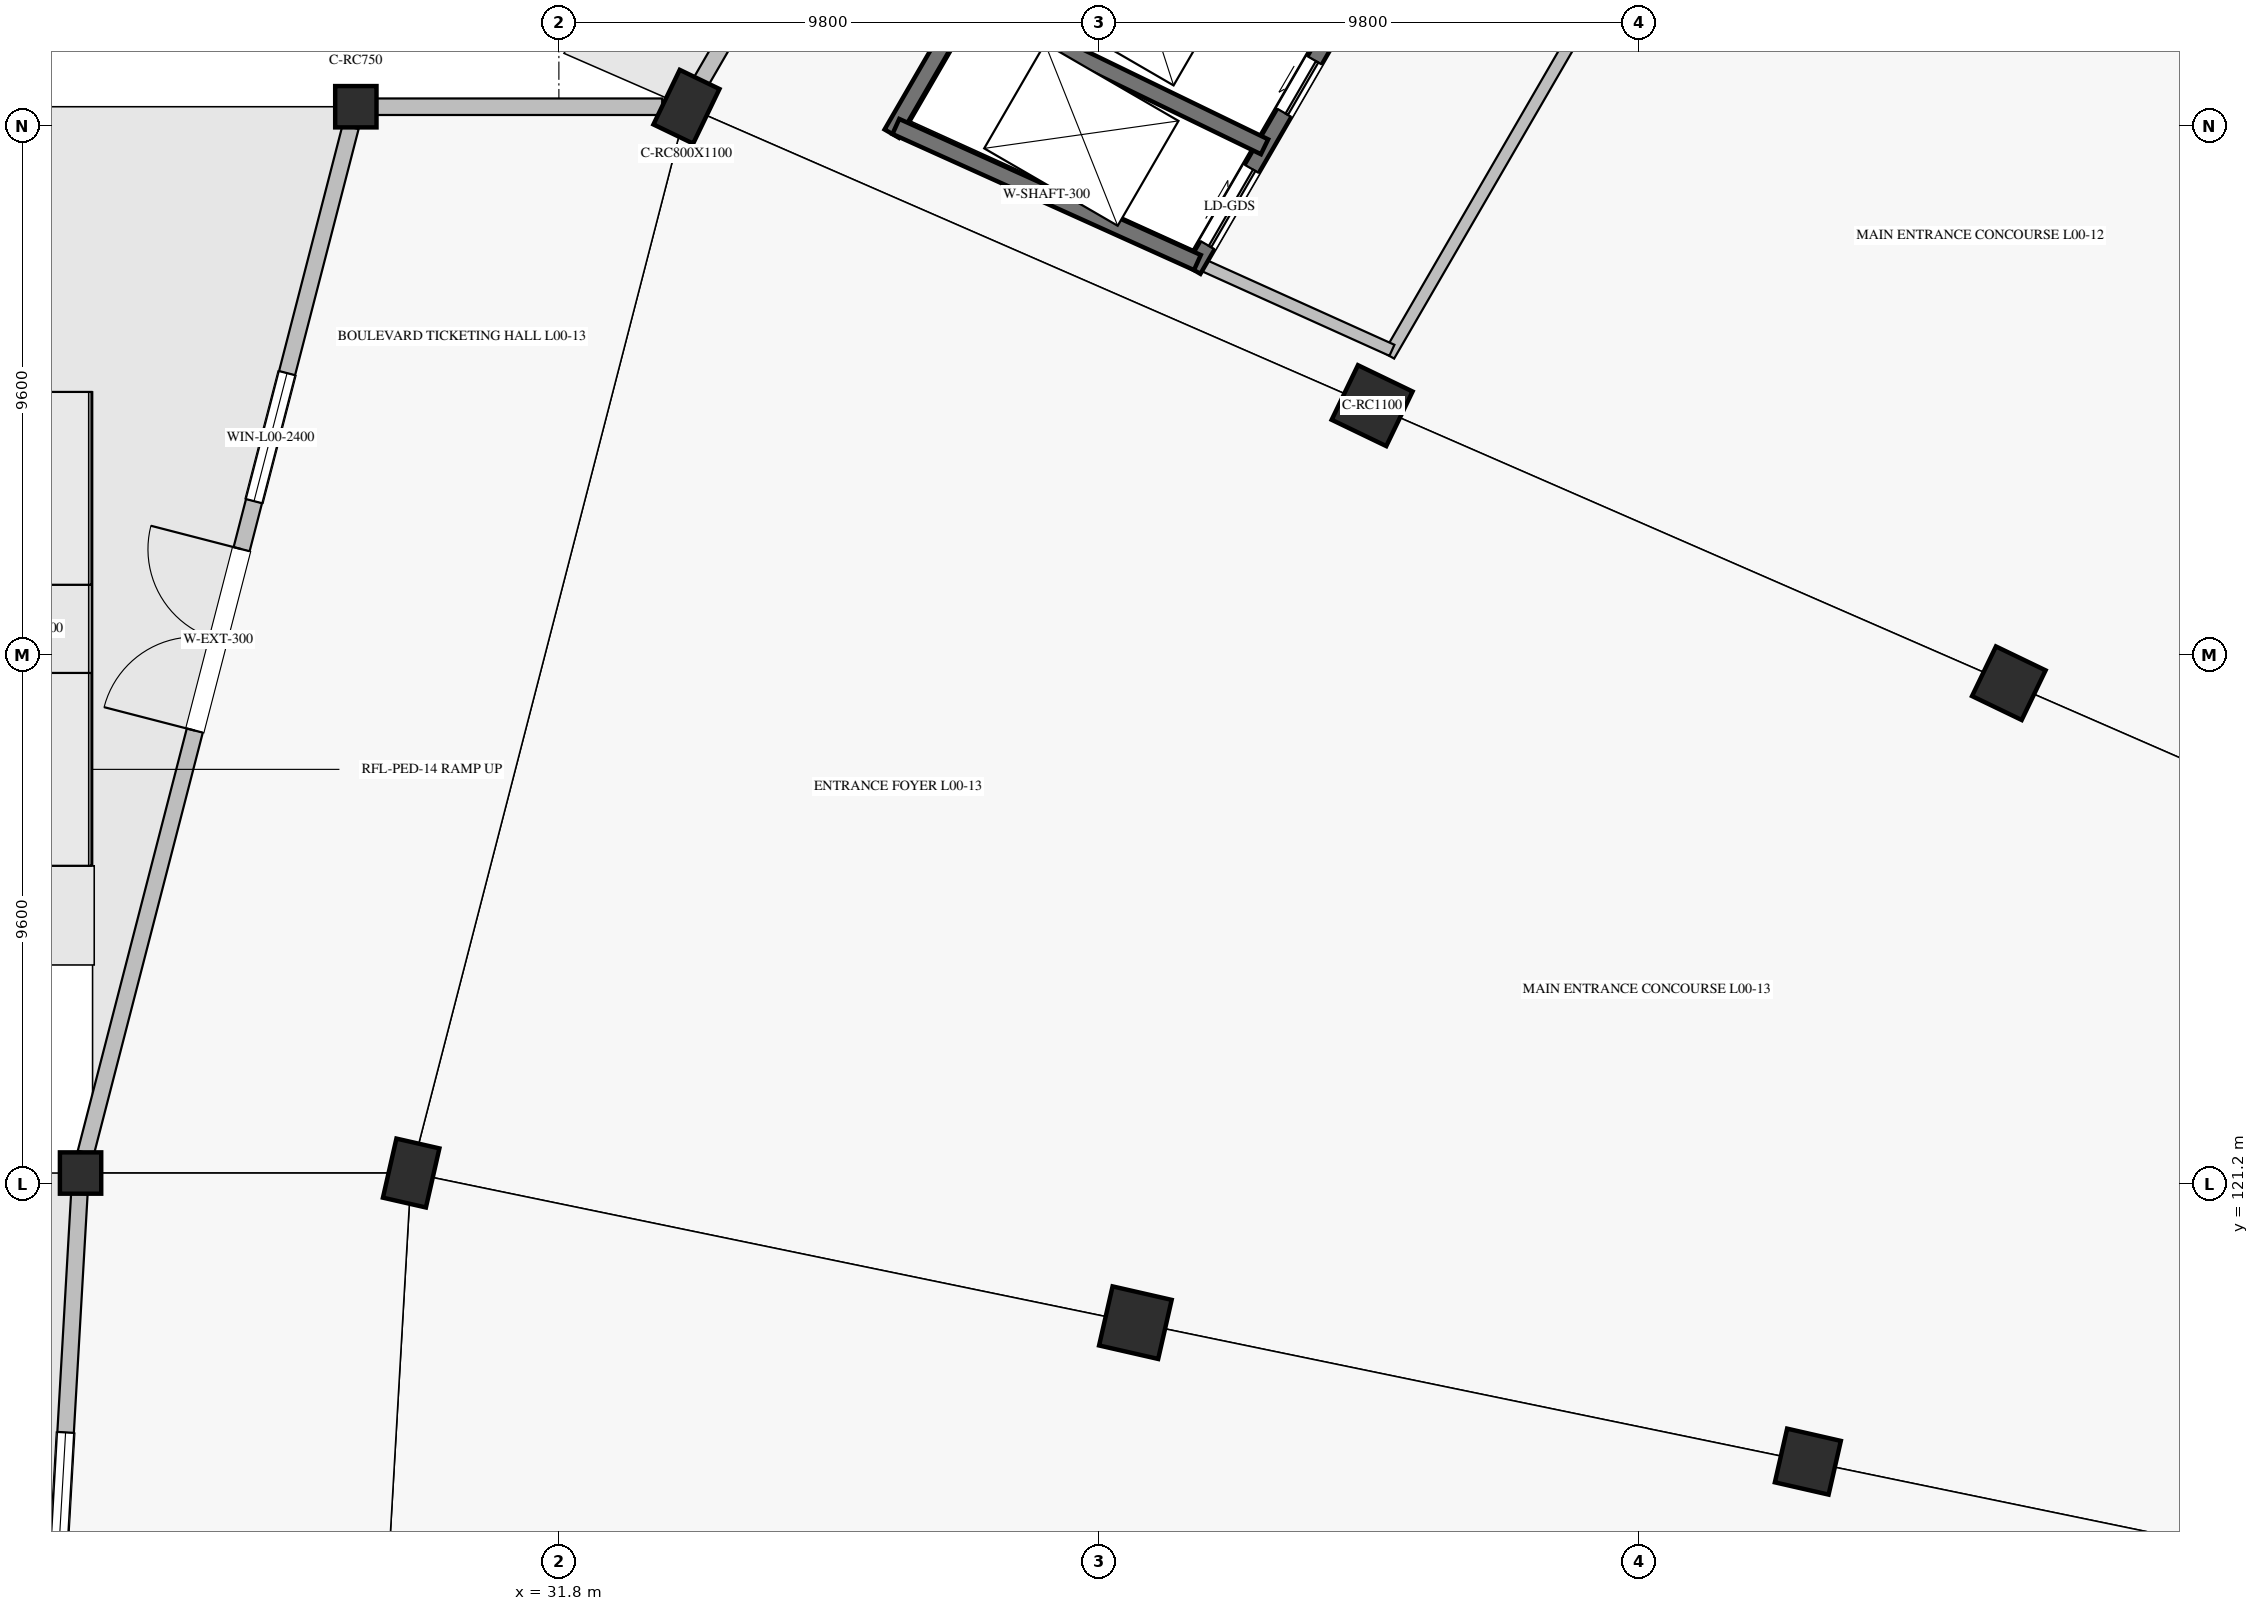
"""IFC4 building model, lengths in metres.
Left out: names, types, materials, properties, quantities, classifications, styles, units other than length and angle.
Written with IfcOpenShell. Run it as: python <this file> out.ifc"""

import sys

from ifc_helpers import new_model, si_unit, direction, frame, frame_2d, origin, origin_2d, place, context, subcontext, project, spatial, rectangle, extrude, element, fill, save


model = new_model("IFC4")
c1 = context("Model", 3, precision=1e-05, world=origin(), true_north=direction((0.0, 1.0)))
c2 = subcontext(c1, "Body", "Model", "MODEL_VIEW")
j1 = project(units=[si_unit("LENGTHUNIT", "METRE"), si_unit("PLANEANGLEUNIT", "RADIAN")], contexts=[c1])
p1 = place(None, origin())
s1 = spatial("IfcSite", under=j1, at=p1, CompositionType="ELEMENT")
p2 = place(p1, origin())
s2 = spatial("IfcBuilding", under=s1, at=p2, CompositionType="ELEMENT")
p3 = place(p2, origin())
s3 = spatial("IfcBuildingStorey", under=s2, at=p3, CompositionType="ELEMENT", Elevation=0.0)
for number, where, z_axis, x_axis in (
    (1, (58.114, 130.287, 0.0), (0.0, 0.0, 1.0), (-0.901, 0.434, 0.0)),
    (2, (54.467, 116.16, 0.0), (0.0, 0.0, 1.0), (-0.975, 0.223, 0.0)),
):
    element("IfcColumn", number, at=place(p3, frame(where, z_axis=z_axis, x_axis=x_axis)), inside=s3, PredefinedType="COLUMN", context=c2, shape_type="SweptSolid", body=[
        extrude(rectangle(XDim=1.0, YDim=1.0, at=origin_2d()), origin(), (0.0, 0.0, 1.0), 5.78),
    ])
for number, where, z_axis, x_axis in (
    (3, (46.559, 135.325, 0.0), (0.0, 0.0, 1.0), (-0.901, 0.434, 0.0)),
    (4, (42.262, 118.682, 0.0), (0.0, 0.0, 1.0), (-0.975, 0.223, 0.0)),
):
    element("IfcColumn", number, at=place(p3, frame(where, z_axis=z_axis, x_axis=x_axis)), inside=s3, PredefinedType="COLUMN", context=c2, shape_type="SweptSolid", body=[
        extrude(rectangle(XDim=1.1, YDim=1.1, at=origin_2d()), origin(), (0.0, 0.0, 1.0), 5.78),
    ])
for number, where, z_axis, x_axis in (
    (5, (34.115, 140.75, 0.0), (0.0, 0.0, 1.0), (-0.901, 0.434, 0.0)),
    (6, (29.119, 121.398, 0.0), (0.0, 0.0, 1.0), (-0.975, 0.223, 0.0)),
):
    element("IfcColumn", number, at=place(p3, frame(where, z_axis=z_axis, x_axis=x_axis)), inside=s3, PredefinedType="COLUMN", context=c2, shape_type="SweptSolid", body=[
        extrude(rectangle(XDim=0.8, YDim=1.1, at=origin_2d()), origin(), (0.0, 0.0, 1.0), 5.78),
    ])
for number, where, z_axis, x_axis in (
    (7, (28.115, 140.75, 0.0), (0.0, 0.0, 1.0), (1.0, 0.0, 0.0)),
    (8, (23.119, 121.398, 0.0), (0.0, 0.0, 1.0), (1.0, 0.0, 0.0)),
):
    element("IfcColumn", number, at=place(p3, frame(where, z_axis=z_axis, x_axis=x_axis)), inside=s3, PredefinedType="COLUMN", context=c2, shape_type="SweptSolid", body=[
        extrude(rectangle(XDim=0.75, YDim=0.75, at=origin_2d()), origin(), (0.0, 0.0, 1.0), 5.78),
    ])
p4 = place(p3, frame((33.675, 140.75, 0.0), z_axis=(0.0, 0.0, 1.0), x_axis=(-1.0, 0.0, 0.0)))
e9 = element("IfcWall", 9, at=p4, inside=s3, PredefinedType="SOLIDWALL", context=c2, shape_type="SweptSolid", body=[
    extrude(rectangle(XDim=5.18, YDim=0.3, at=frame_2d((2.59, 0.0))), origin(), (0.0, 0.0, 1.0), 4.8),
])
p5 = place(p3, frame((44.309, 158.33, 0.0), z_axis=(0.0, 0.0, 1.0), x_axis=(-0.501609752715, -0.865094015689, 0.0)))
e10 = element("IfcWall", 10, at=p5, inside=s3, PredefinedType="SOLIDWALL", context=c2, shape_type="SweptSolid", body=[
    extrude(rectangle(XDim=19.932, YDim=0.3, at=frame_2d((9.966, 0.0))), origin(), (0.0, 0.0, 1.0), 4.8),
])
p6 = place(p5, frame((1.05, 0.0, 0.0)))
e11 = element("IfcOpeningElement", 11, at=p6, cuts=e10, PredefinedType="OPENING", context=c2, shape_type="SweptSolid", body=[
    extrude(rectangle(XDim=2.0, YDim=2.3, at=frame_2d((1.0, 1.15))), frame((0.0, 0.16, 0.0), z_axis=(0.0, -1.0, 0.0), x_axis=(1.0, 0.0, 0.0)), (0.0, 0.0, 1.0), 0.32),
])
p7 = place(p3, frame((28.02, 140.382, 0.0), z_axis=(0.0, 0.0, 1.0), x_axis=(-0.249965196191, -0.968254822189, 0.0)))
e12 = element("IfcWall", 12, at=p7, inside=s3, PredefinedType="SOLIDWALL", context=c2, shape_type="SweptSolid", body=[
    extrude(rectangle(XDim=19.226, YDim=0.3, at=frame_2d((9.613, 0.0))), origin(), (0.0, 0.0, 1.0), 4.8),
])
p8 = place(p7, frame((7.913, 0.0, 0.0)))
e13 = element("IfcOpeningElement", 13, at=p8, cuts=e12, PredefinedType="OPENING", context=c2, shape_type="SweptSolid", body=[
    extrude(rectangle(XDim=3.4, YDim=2.6, at=frame_2d((1.7, 1.3))), frame((0.0, 0.16, 0.0), z_axis=(0.0, -1.0, 0.0), x_axis=(1.0, 0.0, 0.0)), (0.0, 0.0, 1.0), 0.32),
])
p9 = place(p7, frame((4.613, 0.0, 1.1)))
e14 = element("IfcOpeningElement", 14, at=p9, cuts=e12, PredefinedType="OPENING", context=c2, shape_type="SweptSolid", body=[
    extrude(rectangle(XDim=2.4, YDim=1.8, at=frame_2d((1.2, 0.9))), frame((0.0, 0.16, 0.0), z_axis=(0.0, -1.0, 0.0), x_axis=(1.0, 0.0, 0.0)), (0.0, 0.0, 1.0), 0.32),
])
p10 = place(p3, frame((23.097, 121.018, 0.0), z_axis=(0.0, 0.0, 1.0), x_axis=(-0.057602801108, -0.998339580155, 0.0)))
e15 = element("IfcWall", 15, at=p10, inside=s3, PredefinedType="SOLIDWALL", context=c2, shape_type="SweptSolid", body=[
    extrude(rectangle(XDim=18.67, YDim=0.3, at=frame_2d((9.335, 0.0))), origin(), (0.0, 0.0, 1.0), 4.8),
])
p11 = place(p10, frame((7.635, 0.0, 0.0)))
e16 = element("IfcOpeningElement", 16, at=p11, cuts=e15, PredefinedType="OPENING", context=c2, shape_type="SweptSolid", body=[
    extrude(rectangle(XDim=3.4, YDim=2.6, at=frame_2d((1.7, 1.3))), frame((0.0, 0.16, 0.0), z_axis=(0.0, -1.0, 0.0), x_axis=(1.0, 0.0, 0.0)), (0.0, 0.0, 1.0), 0.32),
])
p12 = place(p10, frame((4.335, 0.0, 1.1)))
e17 = element("IfcOpeningElement", 17, at=p12, cuts=e15, PredefinedType="OPENING", context=c2, shape_type="SweptSolid", body=[
    extrude(rectangle(XDim=2.4, YDim=1.8, at=frame_2d((1.2, 0.9))), frame((0.0, 0.16, 0.0), z_axis=(0.0, -1.0, 0.0), x_axis=(1.0, 0.0, 0.0)), (0.0, 0.0, 1.0), 0.32),
])
p13 = place(p3, frame((45.9, 142.254, 0.0), z_axis=(0.0, 0.0, 1.0), x_axis=(-0.501629534056, -0.86508254552, 0.0)))
e18 = element("IfcWall", 18, at=p13, inside=s3, PredefinedType="SHEAR", context=c2, shape_type="SweptSolid", body=[
    extrude(rectangle(XDim=5.157, YDim=0.3, at=frame_2d((2.579, 0.0))), origin(), (0.0, 0.0, 1.0), 5.5),
])
p14 = place(p13, frame((0.766, 0.0, 0.0)))
e19 = element("IfcOpeningElement", 19, at=p14, cuts=e18, PredefinedType="OPENING", context=c2, shape_type="SweptSolid", body=[
    extrude(rectangle(XDim=1.1, YDim=2.2, at=frame_2d((0.55, 1.1))), frame((0.0, 0.16, 0.0), z_axis=(0.0, -1.0, 0.0), x_axis=(1.0, 0.0, 0.0)), (0.0, 0.0, 1.0), 0.32),
])
p15 = place(p13, frame((3.042, 0.0, 0.0)))
e20 = element("IfcOpeningElement", 20, at=p15, cuts=e18, PredefinedType="OPENING", context=c2, shape_type="SweptSolid", body=[
    extrude(rectangle(XDim=1.6, YDim=2.3, at=frame_2d((0.8, 1.15))), frame((0.0, 0.16, 0.0), z_axis=(0.0, -1.0, 0.0), x_axis=(1.0, 0.0, 0.0)), (0.0, 0.0, 1.0), 0.32),
])
p16 = place(p3, frame((40.595, 145.012, 0.0), z_axis=(0.0, 0.0, 1.0), x_axis=(-0.501630260479, -0.865082124293, 0.0)))
e21 = element("IfcWall", 21, at=p16, inside=s3, PredefinedType="SHEAR", context=c2, shape_type="SweptSolid", body=[
    extrude(rectangle(XDim=5.491, YDim=0.3, at=frame_2d((2.746, 0.0))), origin(), (0.0, 0.0, 1.0), 5.5),
])
p17 = place(p3, frame((43.388, 137.922, 0.0), z_axis=(0.0, 0.0, 1.0), x_axis=(-0.911521602376, 0.41125219562, 0.0)))
e22 = element("IfcWall", 22, at=p17, inside=s3, PredefinedType="SHEAR", context=c2, shape_type="SweptSolid", body=[
    extrude(rectangle(XDim=6.004, YDim=0.3, at=frame_2d((3.002, 0.0))), origin(), (0.0, 0.0, 1.0), 5.5),
])
p18 = place(p3, frame((44.606, 140.023, 0.0), z_axis=(0.0, 0.0, 1.0), x_axis=(-0.899759302591, 0.436386522936, 0.0)))
e23 = element("IfcWall", 23, at=p18, inside=s3, PredefinedType="SHEAR", context=c2, shape_type="SweptSolid", body=[
    extrude(rectangle(XDim=5.989, YDim=0.3, at=frame_2d((2.995, 0.0))), origin(), (0.0, 0.0, 1.0), 5.5),
])
p19 = place(p3, frame((54.944, 150.17, 0.0), z_axis=(0.0, 0.0, 1.0), x_axis=(-0.501612626242, -0.865092349518, 0.0)))
e24 = element("IfcWall", 24, at=p19, inside=s3, PredefinedType="SOLIDWALL", context=c2, shape_type="SweptSolid", body=[
    extrude(rectangle(XDim=16.11, YDim=0.22, at=frame_2d((8.055, 0.0))), origin(), (0.0, 0.0, 1.0), 4.448),
])
p20 = place(p19, frame((6.511, 0.0, 0.0)))
e25 = element("IfcOpeningElement", 25, at=p20, cuts=e24, PredefinedType="OPENING", context=c2, shape_type="SweptSolid", body=[
    extrude(rectangle(XDim=1.5, YDim=2.2, at=frame_2d((0.75, 1.1))), frame((0.0, 0.12, 0.0), z_axis=(0.0, -1.0, 0.0), x_axis=(1.0, 0.0, 0.0)), (0.0, 0.0, 1.0), 0.24),
])
p21 = place(p3, frame((46.918, 136.329, 0.0), z_axis=(0.0, 0.0, 1.0), x_axis=(-0.91149641055, 0.411308027582, 0.0)))
e26 = element("IfcWall", 26, at=p21, inside=s3, PredefinedType="SOLIDWALL", context=c2, shape_type="SweptSolid", body=[
    extrude(rectangle(XDim=3.873, YDim=0.22, at=frame_2d((1.937, 0.0))), origin(), (0.0, 0.0, 1.0), 5.5),
])
p22 = place(p8, frame((3.4, 0.0, 0.0), z_axis=(0.0, 0.0, 1.0), x_axis=(-1.0, 0.0, 0.0)))
e27 = element("IfcDoor", 27, at=p22, inside=s3, OperationType="DOUBLE_DOOR_SINGLE_SWING", PredefinedType="DOOR", context=c2, shape_type="SweptSolid", body=[
    extrude(rectangle(XDim=3.4, YDim=2.6, at=frame_2d((1.7, 1.3))), frame((0.0, 0.025, 0.0), z_axis=(0.0, -1.0, 0.0), x_axis=(1.0, 0.0, 0.0)), (0.0, 0.0, 1.0), 0.05),
])
fill(e13, e27)
p23 = place(p9, origin())
e28 = element("IfcWindow", 28, at=p23, inside=s3, PartitioningType="SINGLE_PANEL", PredefinedType="WINDOW", context=c2, shape_type="SweptSolid", body=[
    extrude(rectangle(XDim=2.4, YDim=1.8, at=frame_2d((1.2, 0.9))), frame((0.0, 0.03, 0.0), z_axis=(0.0, -1.0, 0.0), x_axis=(1.0, 0.0, 0.0)), (0.0, 0.0, 1.0), 0.06),
])
fill(e14, e28)
p24 = place(p12, origin())
e29 = element("IfcWindow", 29, at=p24, inside=s3, PartitioningType="SINGLE_PANEL", PredefinedType="WINDOW", context=c2, shape_type="SweptSolid", body=[
    extrude(rectangle(XDim=2.4, YDim=1.8, at=frame_2d((1.2, 0.9))), frame((0.0, 0.03, 0.0), z_axis=(0.0, -1.0, 0.0), x_axis=(1.0, 0.0, 0.0)), (0.0, 0.0, 1.0), 0.06),
])
fill(e17, e29)
p25 = place(p14, origin())
e30 = element("IfcDoor", 30, at=p25, inside=s3, OperationType="SLIDING_TO_RIGHT", PredefinedType="DOOR", context=c2, shape_type="SweptSolid", body=[
    extrude(rectangle(XDim=1.1, YDim=2.2, at=frame_2d((0.55, 1.1))), frame((0.0, 0.025, 0.0), z_axis=(0.0, -1.0, 0.0), x_axis=(1.0, 0.0, 0.0)), (0.0, 0.0, 1.0), 0.05),
])
fill(e19, e30)
p26 = place(p15, origin())
e31 = element("IfcDoor", 31, at=p26, inside=s3, OperationType="SLIDING_TO_LEFT", PredefinedType="DOOR", context=c2, shape_type="SweptSolid", body=[
    extrude(rectangle(XDim=1.6, YDim=2.3, at=frame_2d((0.8, 1.15))), frame((0.0, 0.025, 0.0), z_axis=(0.0, -1.0, 0.0), x_axis=(1.0, 0.0, 0.0)), (0.0, 0.0, 1.0), 0.05),
])
fill(e20, e31)
save(model, sys.argv[1])
